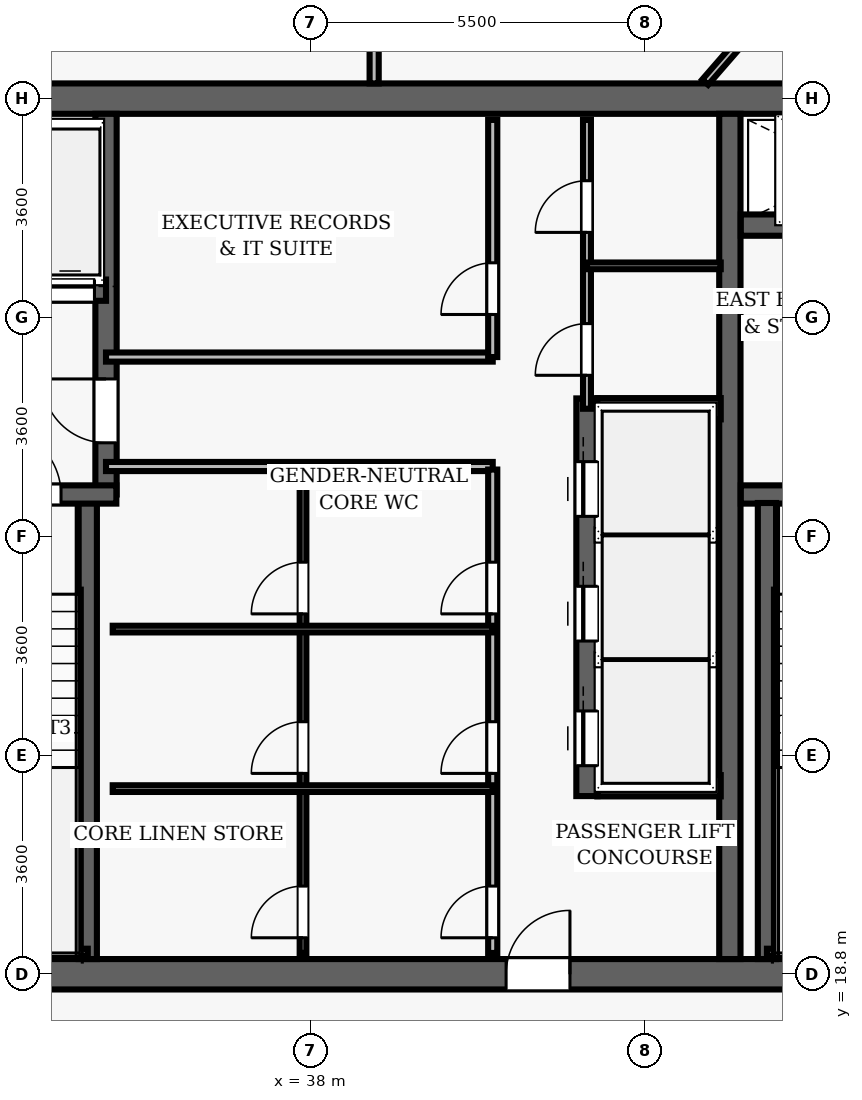
"""IFC4 building model, lengths in metres.
Left out: names, types, materials, properties, quantities, classifications, styles, units other than length and angle.
Written with IfcOpenShell. Run it as: python <this file> out.ifc"""

import sys

from ifc_helpers import new_model, si_unit, direction, frame, frame_2d, origin, place, context, subcontext, project, spatial, rectangle, extrude, element, fill, save


model = new_model("IFC4")
c1 = context("Model", 3, precision=1e-05, world=origin(), true_north=direction((0.0, 1.0)))
c2 = subcontext(c1, "Body", "Model", "MODEL_VIEW")
j1 = project(units=[si_unit("LENGTHUNIT", "METRE"), si_unit("PLANEANGLEUNIT", "RADIAN")], contexts=[c1])
p1 = place(None, origin())
s1 = spatial("IfcSite", under=j1, at=p1, CompositionType="ELEMENT")
p2 = place(p1, origin())
s2 = spatial("IfcBuilding", under=s1, at=p2, CompositionType="ELEMENT")
p3 = place(p2, frame((0.0, 0.0, 292.1)))
s3 = spatial("IfcBuildingStorey", under=s2, at=p3, CompositionType="ELEMENT", Elevation=292.1)
p4 = place(p3, frame((26.75, 18.8, 0.0), z_axis=(0.0, 0.0, 1.0), x_axis=(1.0, 0.0, 0.0)))
e1 = element("IfcWall", 1, at=p4, inside=s3, PredefinedType="SHEAR", context=c2, shape_type="SweptSolid", body=[
    extrude(rectangle(XDim=22.5, YDim=0.5, at=frame_2d((11.25, 0.0))), origin(), (0.0, 0.0, 1.0), 3.85),
])
p5 = place(p4, frame((14.47, 0.0, 0.0)))
e2 = element("IfcOpeningElement", 2, at=p5, cuts=e1, PredefinedType="OPENING", context=c2, shape_type="SweptSolid", body=[
    extrude(rectangle(XDim=1.05, YDim=2.15, at=frame_2d((0.525, 1.075))), frame((0.0, 0.26, 0.0), z_axis=(0.0, -1.0, 0.0), x_axis=(1.0, 0.0, 0.0)), (0.0, 0.0, 1.0), 0.52),
])
p6 = place(p3, frame((26.75, 33.2, 0.0), z_axis=(0.0, 0.0, 1.0), x_axis=(1.0, 0.0, 0.0)))
e3 = element("IfcWall", 3, at=p6, inside=s3, PredefinedType="SHEAR", context=c2, shape_type="SweptSolid", body=[
    extrude(rectangle(XDim=22.5, YDim=0.5, at=frame_2d((11.25, 0.0))), origin(), (0.0, 0.0, 1.0), 3.85),
])
p7 = place(p3, frame((44.9, 19.05, 0.0), z_axis=(0.0, 0.0, 1.0), x_axis=(0.0, 1.0, 0.0)))
e4 = element("IfcWall", 4, at=p7, inside=s3, PredefinedType="SHEAR", context=c2, shape_type="SweptSolid", body=[
    extrude(rectangle(XDim=13.9, YDim=0.35, at=frame_2d((6.95, 0.0))), origin(), (0.0, 0.0, 1.0), 3.85),
])
p8 = place(p3, frame((45.08, 26.69, 0.0), z_axis=(0.0, 0.0, 1.0), x_axis=(1.0, 0.0, 0.0)))
e5 = element("IfcWall", 5, at=p8, inside=s3, PredefinedType="SHEAR", context=c2, shape_type="SweptSolid", body=[
    extrude(rectangle(XDim=3.67, YDim=0.3, at=frame_2d((1.835, 0.0))), origin(), (0.0, 0.0, 1.0), 3.85),
])
p9 = place(p8, frame((1.05, 0.0, 0.0)))
e6 = element("IfcOpeningElement", 6, at=p9, cuts=e5, PredefinedType="OPENING", context=c2, shape_type="SweptSolid", body=[
    extrude(rectangle(XDim=1.1, YDim=2.15, at=frame_2d((0.55, 1.075))), frame((0.0, 0.16, 0.0), z_axis=(0.0, -1.0, 0.0), x_axis=(1.0, 0.0, 0.0)), (0.0, 0.0, 1.0), 0.32),
])
p10 = place(p3, frame((45.51, 19.05, 0.0), z_axis=(0.0, 0.0, 1.0), x_axis=(0.0, 1.0, 0.0)))
e7 = element("IfcWall", 7, at=p10, inside=s3, PredefinedType="SHEAR", context=c2, shape_type="SweptSolid", body=[
    extrude(rectangle(XDim=7.5, YDim=0.3, at=frame_2d((3.75, 0.0))), origin(), (0.0, 0.0, 1.0), 3.85),
])
p11 = place(p3, frame((45.51, 19.16, 0.0), z_axis=(0.0, 0.0, 1.0), x_axis=(1.0, 0.0, 0.0)))
e8 = element("IfcWall", 8, at=p11, inside=s3, PredefinedType="SHEAR", context=c2, shape_type="SweptSolid", body=[
    extrude(rectangle(XDim=3.095, YDim=0.12, at=frame_2d((1.547, 0.0))), origin(), (0.0, 0.0, 1.0), 3.85),
])
p12 = place(p3, frame((45.08, 31.12, 0.0), z_axis=(0.0, 0.0, 1.0), x_axis=(1.0, 0.0, 0.0)))
e9 = element("IfcWall", 9, at=p12, inside=s3, PredefinedType="SHEAR", context=c2, shape_type="SweptSolid", body=[
    extrude(rectangle(XDim=3.67, YDim=0.35, at=frame_2d((1.835, 0.0))), origin(), (0.0, 0.0, 1.0), 3.04),
])
p13 = place(p12, frame((1.25, 0.0, 0.0)))
e10 = element("IfcOpeningElement", 10, at=p13, cuts=e9, PredefinedType="OPENING", context=c2, shape_type="SweptSolid", body=[
    extrude(rectangle(XDim=1.1, YDim=2.15, at=frame_2d((0.55, 1.075))), frame((0.0, 0.185, 0.0), z_axis=(0.0, -1.0, 0.0), x_axis=(1.0, 0.0, 0.0)), (0.0, 0.0, 1.0), 0.37),
])
p14 = place(p3, frame((34.34, 19.05, 0.0), z_axis=(0.0, 0.0, 1.0), x_axis=(0.0, 1.0, 0.0)))
e11 = element("IfcWall", 11, at=p14, inside=s3, PredefinedType="SHEAR", context=c2, shape_type="SweptSolid", body=[
    extrude(rectangle(XDim=7.5, YDim=0.3, at=frame_2d((3.75, 0.0))), origin(), (0.0, 0.0, 1.0), 3.85),
])
p15 = place(p3, frame((34.64, 26.69, 0.0), z_axis=(0.0, 0.0, 1.0), x_axis=(0.0, 1.0, 0.0)))
e12 = element("IfcWall", 12, at=p15, inside=s3, PredefinedType="SHEAR", context=c2, shape_type="SweptSolid", body=[
    extrude(rectangle(XDim=6.26, YDim=0.35, at=frame_2d((3.13, 0.0))), origin(), (0.0, 0.0, 1.0), 3.85),
])
p16 = place(p15, frame((0.85, 0.0, 0.0)))
e13 = element("IfcOpeningElement", 13, at=p16, cuts=e12, PredefinedType="OPENING", context=c2, shape_type="SweptSolid", body=[
    extrude(rectangle(XDim=1.05, YDim=2.15, at=frame_2d((0.525, 1.075))), frame((0.0, 0.185, 0.0), z_axis=(0.0, -1.0, 0.0), x_axis=(1.0, 0.0, 0.0)), (0.0, 0.0, 1.0), 0.37),
])
p17 = place(p3, frame((31.25, 26.69, 0.0), z_axis=(0.0, 0.0, 1.0), x_axis=(1.0, 0.0, 0.0)))
e14 = element("IfcWall", 14, at=p17, inside=s3, PredefinedType="SHEAR", context=c2, shape_type="SweptSolid", body=[
    extrude(rectangle(XDim=3.56, YDim=0.3, at=frame_2d((1.78, 0.0))), origin(), (0.0, 0.0, 1.0), 3.85),
])
p18 = place(p17, frame((1.55, 0.0, 0.0)))
e15 = element("IfcOpeningElement", 15, at=p18, cuts=e14, PredefinedType="OPENING", context=c2, shape_type="SweptSolid", body=[
    extrude(rectangle(XDim=1.1, YDim=2.15, at=frame_2d((0.55, 1.075))), frame((0.0, 0.16, 0.0), z_axis=(0.0, -1.0, 0.0), x_axis=(1.0, 0.0, 0.0)), (0.0, 0.0, 1.0), 0.32),
])
p19 = place(p3, frame((31.3, 19.16, 0.0), z_axis=(0.0, 0.0, 1.0), x_axis=(1.0, 0.0, 0.0)))
e16 = element("IfcWall", 16, at=p19, inside=s3, PredefinedType="SHEAR", context=c2, shape_type="SweptSolid", body=[
    extrude(rectangle(XDim=3.04, YDim=0.12, at=frame_2d((1.52, 0.0))), origin(), (0.0, 0.0, 1.0), 3.85),
])
p20 = place(p3, frame((32.23, 30.05, 0.0), z_axis=(0.0, 0.0, 1.0), x_axis=(1.0, 0.0, 0.0)))
e17 = element("IfcWall", 17, at=p20, inside=s3, PredefinedType="SHEAR", context=c2, shape_type="SweptSolid", body=[
    extrude(rectangle(XDim=2.41, YDim=0.35, at=frame_2d((1.205, 0.0))), origin(), (0.0, 0.0, 1.0), 3.04),
])
p21 = place(p20, frame((0.42, 0.0, 0.0)))
e18 = element("IfcOpeningElement", 18, at=p21, cuts=e17, PredefinedType="OPENING", context=c2, shape_type="SweptSolid", body=[
    extrude(rectangle(XDim=0.8, YDim=2.15, at=frame_2d((0.4, 1.075))), frame((0.0, 0.185, 0.0), z_axis=(0.0, -1.0, 0.0), x_axis=(1.0, 0.0, 0.0)), (0.0, 0.0, 1.0), 0.37),
])
p22 = place(p20, frame((1.42, 0.0, 0.0)))
e19 = element("IfcOpeningElement", 19, at=p22, cuts=e17, PredefinedType="OPENING", context=c2, shape_type="SweptSolid", body=[
    extrude(rectangle(XDim=0.8, YDim=2.15, at=frame_2d((0.4, 1.075))), frame((0.0, 0.185, 0.0), z_axis=(0.0, -1.0, 0.0), x_axis=(1.0, 0.0, 0.0)), (0.0, 0.0, 1.0), 0.37),
])
p23 = place(p3, frame((42.55, 21.73, 0.0), z_axis=(0.0, 0.0, 1.0), x_axis=(0.0, 1.0, 0.0)))
e20 = element("IfcWall", 20, at=p23, inside=s3, PredefinedType="SHEAR", context=c2, shape_type="SweptSolid", body=[
    extrude(rectangle(XDim=6.54, YDim=0.35, at=frame_2d((3.27, 0.0))), origin(), (0.0, 0.0, 1.0), 3.04),
])
p24 = place(p23, frame((0.5, 0.0, 0.0)))
e21 = element("IfcOpeningElement", 21, at=p24, cuts=e20, PredefinedType="OPENING", context=c2, shape_type="SweptSolid", body=[
    extrude(rectangle(XDim=0.9, YDim=2.15, at=frame_2d((0.45, 1.075))), frame((0.0, 0.185, 0.0), z_axis=(0.0, -1.0, 0.0), x_axis=(1.0, 0.0, 0.0)), (0.0, 0.0, 1.0), 0.37),
])
p25 = place(p23, frame((2.55, 0.0, 0.0)))
e22 = element("IfcOpeningElement", 22, at=p25, cuts=e20, PredefinedType="OPENING", context=c2, shape_type="SweptSolid", body=[
    extrude(rectangle(XDim=0.9, YDim=2.15, at=frame_2d((0.45, 1.075))), frame((0.0, 0.185, 0.0), z_axis=(0.0, -1.0, 0.0), x_axis=(1.0, 0.0, 0.0)), (0.0, 0.0, 1.0), 0.37),
])
p26 = place(p23, frame((4.6, 0.0, 0.0)))
e23 = element("IfcOpeningElement", 23, at=p26, cuts=e20, PredefinedType="OPENING", context=c2, shape_type="SweptSolid", body=[
    extrude(rectangle(XDim=0.9, YDim=2.15, at=frame_2d((0.45, 1.075))), frame((0.0, 0.185, 0.0), z_axis=(0.0, -1.0, 0.0), x_axis=(1.0, 0.0, 0.0)), (0.0, 0.0, 1.0), 0.37),
])
for number, where, z_axis, x_axis in (
    (24, (42.72, 21.9, 0.0), (0.0, 0.0, 1.0), (1.0, 0.0, 0.0)),
    (25, (42.72, 28.1, 0.0), (0.0, 0.0, 1.0), (1.0, 0.0, 0.0)),
):
    element("IfcWall", number, at=place(p3, frame(where, z_axis=z_axis, x_axis=x_axis)), inside=s3, PredefinedType="SHEAR", context=c2, shape_type="SweptSolid", body=[
        extrude(rectangle(XDim=2.03, YDim=0.35, at=frame_2d((1.015, 0.0))), origin(), (0.0, 0.0, 1.0), 3.04),
    ])
for number, where, z_axis, x_axis in (
    (26, (34.64, 27.15, 0.0), (0.0, 0.0, 1.0), (1.0, 0.0, 0.0)),
    (27, (34.64, 28.95, 0.0), (0.0, 0.0, 1.0), (1.0, 0.0, 0.0)),
):
    element("IfcWall", number, at=place(p3, frame(where, z_axis=z_axis, x_axis=x_axis)), inside=s3, PredefinedType="PARTITIONING", context=c2, shape_type="SweptSolid", body=[
        extrude(rectangle(XDim=6.36, YDim=0.15, at=frame_2d((3.18, 0.0))), origin(), (0.0, 0.0, 1.0), 3.04),
    ])
p27 = place(p3, frame((41.0, 28.95, 0.0), z_axis=(0.0, 0.0, 1.0), x_axis=(0.0, 1.0, 0.0)))
e28 = element("IfcWall", 28, at=p27, inside=s3, PredefinedType="PARTITIONING", context=c2, shape_type="SweptSolid", body=[
    extrude(rectangle(XDim=3.9, YDim=0.15, at=frame_2d((1.95, 0.0))), origin(), (0.0, 0.0, 1.0), 3.04),
])
p28 = place(p27, frame((0.7, 0.0, 0.0)))
e29 = element("IfcOpeningElement", 29, at=p28, cuts=e28, PredefinedType="OPENING", context=c2, shape_type="SweptSolid", body=[
    extrude(rectangle(XDim=0.85, YDim=2.1, at=frame_2d((0.425, 1.05))), frame((0.0, 0.085, 0.0), z_axis=(0.0, -1.0, 0.0), x_axis=(1.0, 0.0, 0.0)), (0.0, 0.0, 1.0), 0.17),
])
p29 = place(p3, frame((41.0, 19.15, 0.0), z_axis=(0.0, 0.0, 1.0), x_axis=(0.0, 1.0, 0.0)))
e30 = element("IfcWall", 30, at=p29, inside=s3, PredefinedType="PARTITIONING", context=c2, shape_type="SweptSolid", body=[
    extrude(rectangle(XDim=7.95, YDim=0.15, at=frame_2d((3.975, 0.0))), origin(), (0.0, 0.0, 1.0), 3.04),
])
p30 = place(p29, frame((0.25, 0.0, 0.0)))
e31 = element("IfcOpeningElement", 31, at=p30, cuts=e30, PredefinedType="OPENING", context=c2, shape_type="SweptSolid", body=[
    extrude(rectangle(XDim=0.85, YDim=2.1, at=frame_2d((0.425, 1.05))), frame((0.0, 0.085, 0.0), z_axis=(0.0, -1.0, 0.0), x_axis=(1.0, 0.0, 0.0)), (0.0, 0.0, 1.0), 0.17),
])
p31 = place(p29, frame((2.953, 0.0, 0.0)))
e32 = element("IfcOpeningElement", 32, at=p31, cuts=e30, PredefinedType="OPENING", context=c2, shape_type="SweptSolid", body=[
    extrude(rectangle(XDim=0.85, YDim=2.1, at=frame_2d((0.425, 1.05))), frame((0.0, 0.085, 0.0), z_axis=(0.0, -1.0, 0.0), x_axis=(1.0, 0.0, 0.0)), (0.0, 0.0, 1.0), 0.17),
])
p32 = place(p29, frame((5.576, 0.0, 0.0)))
e33 = element("IfcOpeningElement", 33, at=p32, cuts=e30, PredefinedType="OPENING", context=c2, shape_type="SweptSolid", body=[
    extrude(rectangle(XDim=0.85, YDim=2.1, at=frame_2d((0.425, 1.05))), frame((0.0, 0.085, 0.0), z_axis=(0.0, -1.0, 0.0), x_axis=(1.0, 0.0, 0.0)), (0.0, 0.0, 1.0), 0.17),
])
p33 = place(p3, frame((37.88, 19.15, 0.0), z_axis=(0.0, 0.0, 1.0), x_axis=(0.0, 1.0, 0.0)))
e34 = element("IfcWall", 34, at=p33, inside=s3, PredefinedType="PARTITIONING", context=c2, shape_type="SweptSolid", body=[
    extrude(rectangle(XDim=7.95, YDim=0.11, at=frame_2d((3.975, 0.0))), origin(), (0.0, 0.0, 1.0), 3.04),
])
p34 = place(p33, frame((0.25, 0.0, 0.0)))
e35 = element("IfcOpeningElement", 35, at=p34, cuts=e34, PredefinedType="OPENING", context=c2, shape_type="SweptSolid", body=[
    extrude(rectangle(XDim=0.85, YDim=2.1, at=frame_2d((0.425, 1.05))), frame((0.0, 0.065, 0.0), z_axis=(0.0, -1.0, 0.0), x_axis=(1.0, 0.0, 0.0)), (0.0, 0.0, 1.0), 0.13),
])
p35 = place(p33, frame((2.953, 0.0, 0.0)))
e36 = element("IfcOpeningElement", 36, at=p35, cuts=e34, PredefinedType="OPENING", context=c2, shape_type="SweptSolid", body=[
    extrude(rectangle(XDim=0.85, YDim=2.1, at=frame_2d((0.425, 1.05))), frame((0.0, 0.065, 0.0), z_axis=(0.0, -1.0, 0.0), x_axis=(1.0, 0.0, 0.0)), (0.0, 0.0, 1.0), 0.13),
])
p36 = place(p33, frame((5.576, 0.0, 0.0)))
e37 = element("IfcOpeningElement", 37, at=p36, cuts=e34, PredefinedType="OPENING", context=c2, shape_type="SweptSolid", body=[
    extrude(rectangle(XDim=0.85, YDim=2.1, at=frame_2d((0.425, 1.05))), frame((0.0, 0.065, 0.0), z_axis=(0.0, -1.0, 0.0), x_axis=(1.0, 0.0, 0.0)), (0.0, 0.0, 1.0), 0.13),
])
for number, where, z_axis, x_axis in (
    (38, (34.75, 21.853, 0.0), (0.0, 0.0, 1.0), (1.0, 0.0, 0.0)),
    (39, (34.75, 24.477, 0.0), (0.0, 0.0, 1.0), (1.0, 0.0, 0.0)),
):
    element("IfcWall", number, at=place(p3, frame(where, z_axis=z_axis, x_axis=x_axis)), inside=s3, PredefinedType="PARTITIONING", context=c2, shape_type="SweptSolid", body=[
        extrude(rectangle(XDim=6.25, YDim=0.11, at=frame_2d((3.125, 0.0))), origin(), (0.0, 0.0, 1.0), 3.04),
    ])
p37 = place(p3, frame((42.55, 28.1, 0.0), z_axis=(0.0, 0.0, 1.0), x_axis=(0.0, 1.0, 0.0)))
e40 = element("IfcWall", 40, at=p37, inside=s3, PredefinedType="PARTITIONING", context=c2, shape_type="SweptSolid", body=[
    extrude(rectangle(XDim=4.75, YDim=0.13, at=frame_2d((2.375, 0.0))), origin(), (0.0, 0.0, 1.0), 3.04),
])
p38 = place(p37, frame((0.55, 0.0, 0.0)))
e41 = element("IfcOpeningElement", 41, at=p38, cuts=e40, PredefinedType="OPENING", context=c2, shape_type="SweptSolid", body=[
    extrude(rectangle(XDim=0.85, YDim=2.1, at=frame_2d((0.425, 1.05))), frame((0.0, 0.075, 0.0), z_axis=(0.0, -1.0, 0.0), x_axis=(1.0, 0.0, 0.0)), (0.0, 0.0, 1.0), 0.15),
])
p39 = place(p37, frame((2.9, 0.0, 0.0)))
e42 = element("IfcOpeningElement", 42, at=p39, cuts=e40, PredefinedType="OPENING", context=c2, shape_type="SweptSolid", body=[
    extrude(rectangle(XDim=0.85, YDim=2.1, at=frame_2d((0.425, 1.05))), frame((0.0, 0.075, 0.0), z_axis=(0.0, -1.0, 0.0), x_axis=(1.0, 0.0, 0.0)), (0.0, 0.0, 1.0), 0.15),
])
p40 = place(p3, frame((42.55, 30.45, 0.0), z_axis=(0.0, 0.0, 1.0), x_axis=(1.0, 0.0, 0.0)))
e43 = element("IfcWall", 43, at=p40, inside=s3, PredefinedType="PARTITIONING", context=c2, shape_type="SweptSolid", body=[
    extrude(rectangle(XDim=2.2, YDim=0.11, at=frame_2d((1.1, 0.0))), origin(), (0.0, 0.0, 1.0), 3.04),
])
p41 = place(p3, frame((39.05, 33.45, 0.0), z_axis=(0.0, 0.0, 1.0), x_axis=(0.0, 1.0, 0.0)))
e44 = element("IfcWall", 44, at=p41, inside=s3, PredefinedType="PARTITIONING", context=c2, shape_type="SweptSolid", body=[
    extrude(rectangle(XDim=6.95, YDim=0.15, at=frame_2d((3.475, 0.0))), origin(), (0.0, 0.0, 1.0), 3.04),
])
p42 = place(p41, frame((0.988, 0.0, 0.0)))
e45 = element("IfcOpeningElement", 45, at=p42, cuts=e44, PredefinedType="OPENING", context=c2, shape_type="SweptSolid", body=[
    extrude(rectangle(XDim=1.5, YDim=2.2, at=frame_2d((0.75, 1.1))), frame((0.0, 0.085, 0.0), z_axis=(0.0, -1.0, 0.0), x_axis=(1.0, 0.0, 0.0)), (0.0, 0.0, 1.0), 0.17),
])
p43 = place(p3, frame((44.494, 33.47, 0.0), z_axis=(0.0, 0.0, 1.0), x_axis=(0.656056181598, 0.754712055414, 0.0)))
e46 = element("IfcWall", 46, at=p43, inside=s3, PredefinedType="PARTITIONING", context=c2, shape_type="SweptSolid", body=[
    extrude(rectangle(XDim=6.808, YDim=0.13, at=frame_2d((3.404, 0.0))), origin(), (0.0, 0.0, 1.0), 3.04),
])
p44 = place(p18, origin())
e47 = element("IfcDoor", 47, at=p44, inside=s3, OperationType="SINGLE_SWING_LEFT", PredefinedType="DOOR", context=c2, shape_type="SweptSolid", body=[
    extrude(rectangle(XDim=1.1, YDim=2.15, at=frame_2d((0.55, 1.075))), frame((0.0, 0.025, 0.0), z_axis=(0.0, -1.0, 0.0), x_axis=(1.0, 0.0, 0.0)), (0.0, 0.0, 1.0), 0.05),
])
fill(e15, e47)
p45 = place(p5, origin())
e48 = element("IfcDoor", 48, at=p45, inside=s3, OperationType="SINGLE_SWING_RIGHT", PredefinedType="DOOR", context=c2, shape_type="SweptSolid", body=[
    extrude(rectangle(XDim=1.05, YDim=2.15, at=frame_2d((0.525, 1.075))), frame((0.0, 0.025, 0.0), z_axis=(0.0, -1.0, 0.0), x_axis=(1.0, 0.0, 0.0)), (0.0, 0.0, 1.0), 0.05),
])
fill(e2, e48)
p46 = place(p16, origin())
e49 = element("IfcDoor", 49, at=p46, inside=s3, OperationType="SINGLE_SWING_RIGHT", PredefinedType="DOOR", context=c2, shape_type="SweptSolid", body=[
    extrude(rectangle(XDim=1.05, YDim=2.15, at=frame_2d((0.525, 1.075))), frame((0.0, 0.025, 0.0), z_axis=(0.0, -1.0, 0.0), x_axis=(1.0, 0.0, 0.0)), (0.0, 0.0, 1.0), 0.05),
])
fill(e13, e49)
p47 = place(p28, origin())
e50 = element("IfcDoor", 50, at=p47, inside=s3, OperationType="SINGLE_SWING_LEFT", PredefinedType="DOOR", context=c2, shape_type="SweptSolid", body=[
    extrude(rectangle(XDim=0.85, YDim=2.1, at=frame_2d((0.425, 1.05))), frame((0.0, 0.025, 0.0), z_axis=(0.0, -1.0, 0.0), x_axis=(1.0, 0.0, 0.0)), (0.0, 0.0, 1.0), 0.05),
])
fill(e29, e50)
p48 = place(p30, origin())
e51 = element("IfcDoor", 51, at=p48, inside=s3, OperationType="SINGLE_SWING_LEFT", PredefinedType="DOOR", context=c2, shape_type="SweptSolid", body=[
    extrude(rectangle(XDim=0.85, YDim=2.1, at=frame_2d((0.425, 1.05))), frame((0.0, 0.025, 0.0), z_axis=(0.0, -1.0, 0.0), x_axis=(1.0, 0.0, 0.0)), (0.0, 0.0, 1.0), 0.05),
])
fill(e31, e51)
p49 = place(p34, origin())
e52 = element("IfcDoor", 52, at=p49, inside=s3, OperationType="SINGLE_SWING_LEFT", PredefinedType="DOOR", context=c2, shape_type="SweptSolid", body=[
    extrude(rectangle(XDim=0.85, YDim=2.1, at=frame_2d((0.425, 1.05))), frame((0.0, 0.025, 0.0), z_axis=(0.0, -1.0, 0.0), x_axis=(1.0, 0.0, 0.0)), (0.0, 0.0, 1.0), 0.05),
])
fill(e35, e52)
p50 = place(p31, origin())
e53 = element("IfcDoor", 53, at=p50, inside=s3, OperationType="SINGLE_SWING_LEFT", PredefinedType="DOOR", context=c2, shape_type="SweptSolid", body=[
    extrude(rectangle(XDim=0.85, YDim=2.1, at=frame_2d((0.425, 1.05))), frame((0.0, 0.025, 0.0), z_axis=(0.0, -1.0, 0.0), x_axis=(1.0, 0.0, 0.0)), (0.0, 0.0, 1.0), 0.05),
])
fill(e32, e53)
p51 = place(p35, origin())
e54 = element("IfcDoor", 54, at=p51, inside=s3, OperationType="SINGLE_SWING_LEFT", PredefinedType="DOOR", context=c2, shape_type="SweptSolid", body=[
    extrude(rectangle(XDim=0.85, YDim=2.1, at=frame_2d((0.425, 1.05))), frame((0.0, 0.025, 0.0), z_axis=(0.0, -1.0, 0.0), x_axis=(1.0, 0.0, 0.0)), (0.0, 0.0, 1.0), 0.05),
])
fill(e36, e54)
p52 = place(p32, origin())
e55 = element("IfcDoor", 55, at=p52, inside=s3, OperationType="SINGLE_SWING_LEFT", PredefinedType="DOOR", context=c2, shape_type="SweptSolid", body=[
    extrude(rectangle(XDim=0.85, YDim=2.1, at=frame_2d((0.425, 1.05))), frame((0.0, 0.025, 0.0), z_axis=(0.0, -1.0, 0.0), x_axis=(1.0, 0.0, 0.0)), (0.0, 0.0, 1.0), 0.05),
])
fill(e33, e55)
p53 = place(p36, origin())
e56 = element("IfcDoor", 56, at=p53, inside=s3, OperationType="SINGLE_SWING_LEFT", PredefinedType="DOOR", context=c2, shape_type="SweptSolid", body=[
    extrude(rectangle(XDim=0.85, YDim=2.1, at=frame_2d((0.425, 1.05))), frame((0.0, 0.025, 0.0), z_axis=(0.0, -1.0, 0.0), x_axis=(1.0, 0.0, 0.0)), (0.0, 0.0, 1.0), 0.05),
])
fill(e37, e56)
p54 = place(p38, origin())
e57 = element("IfcDoor", 57, at=p54, inside=s3, OperationType="SINGLE_SWING_LEFT", PredefinedType="DOOR", context=c2, shape_type="SweptSolid", body=[
    extrude(rectangle(XDim=0.85, YDim=2.1, at=frame_2d((0.425, 1.05))), frame((0.0, 0.025, 0.0), z_axis=(0.0, -1.0, 0.0), x_axis=(1.0, 0.0, 0.0)), (0.0, 0.0, 1.0), 0.05),
])
fill(e41, e57)
p55 = place(p39, origin())
e58 = element("IfcDoor", 58, at=p55, inside=s3, OperationType="SINGLE_SWING_LEFT", PredefinedType="DOOR", context=c2, shape_type="SweptSolid", body=[
    extrude(rectangle(XDim=0.85, YDim=2.1, at=frame_2d((0.425, 1.05))), frame((0.0, 0.025, 0.0), z_axis=(0.0, -1.0, 0.0), x_axis=(1.0, 0.0, 0.0)), (0.0, 0.0, 1.0), 0.05),
])
fill(e42, e58)
p56 = place(p24, origin())
e59 = element("IfcDoor", 59, at=p56, inside=s3, OperationType="SLIDING_TO_LEFT", PredefinedType="DOOR", context=c2, shape_type="SweptSolid", body=[
    extrude(rectangle(XDim=0.9, YDim=2.15, at=frame_2d((0.45, 1.075))), frame((0.0, 0.025, 0.0), z_axis=(0.0, -1.0, 0.0), x_axis=(1.0, 0.0, 0.0)), (0.0, 0.0, 1.0), 0.05),
])
fill(e21, e59)
p57 = place(p25, origin())
e60 = element("IfcDoor", 60, at=p57, inside=s3, OperationType="SLIDING_TO_LEFT", PredefinedType="DOOR", context=c2, shape_type="SweptSolid", body=[
    extrude(rectangle(XDim=0.9, YDim=2.15, at=frame_2d((0.45, 1.075))), frame((0.0, 0.025, 0.0), z_axis=(0.0, -1.0, 0.0), x_axis=(1.0, 0.0, 0.0)), (0.0, 0.0, 1.0), 0.05),
])
fill(e22, e60)
p58 = place(p26, origin())
e61 = element("IfcDoor", 61, at=p58, inside=s3, OperationType="SLIDING_TO_LEFT", PredefinedType="DOOR", context=c2, shape_type="SweptSolid", body=[
    extrude(rectangle(XDim=0.9, YDim=2.15, at=frame_2d((0.45, 1.075))), frame((0.0, 0.025, 0.0), z_axis=(0.0, -1.0, 0.0), x_axis=(1.0, 0.0, 0.0)), (0.0, 0.0, 1.0), 0.05),
])
fill(e23, e61)
p59 = place(p22, origin())
e62 = element("IfcDoor", 62, at=p59, inside=s3, OperationType="SLIDING_TO_LEFT", PredefinedType="DOOR", context=c2, shape_type="SweptSolid", body=[
    extrude(rectangle(XDim=0.8, YDim=2.15, at=frame_2d((0.4, 1.075))), frame((0.0, 0.025, 0.0), z_axis=(0.0, -1.0, 0.0), x_axis=(1.0, 0.0, 0.0)), (0.0, 0.0, 1.0), 0.05),
])
fill(e19, e62)
save(model, sys.argv[1])
